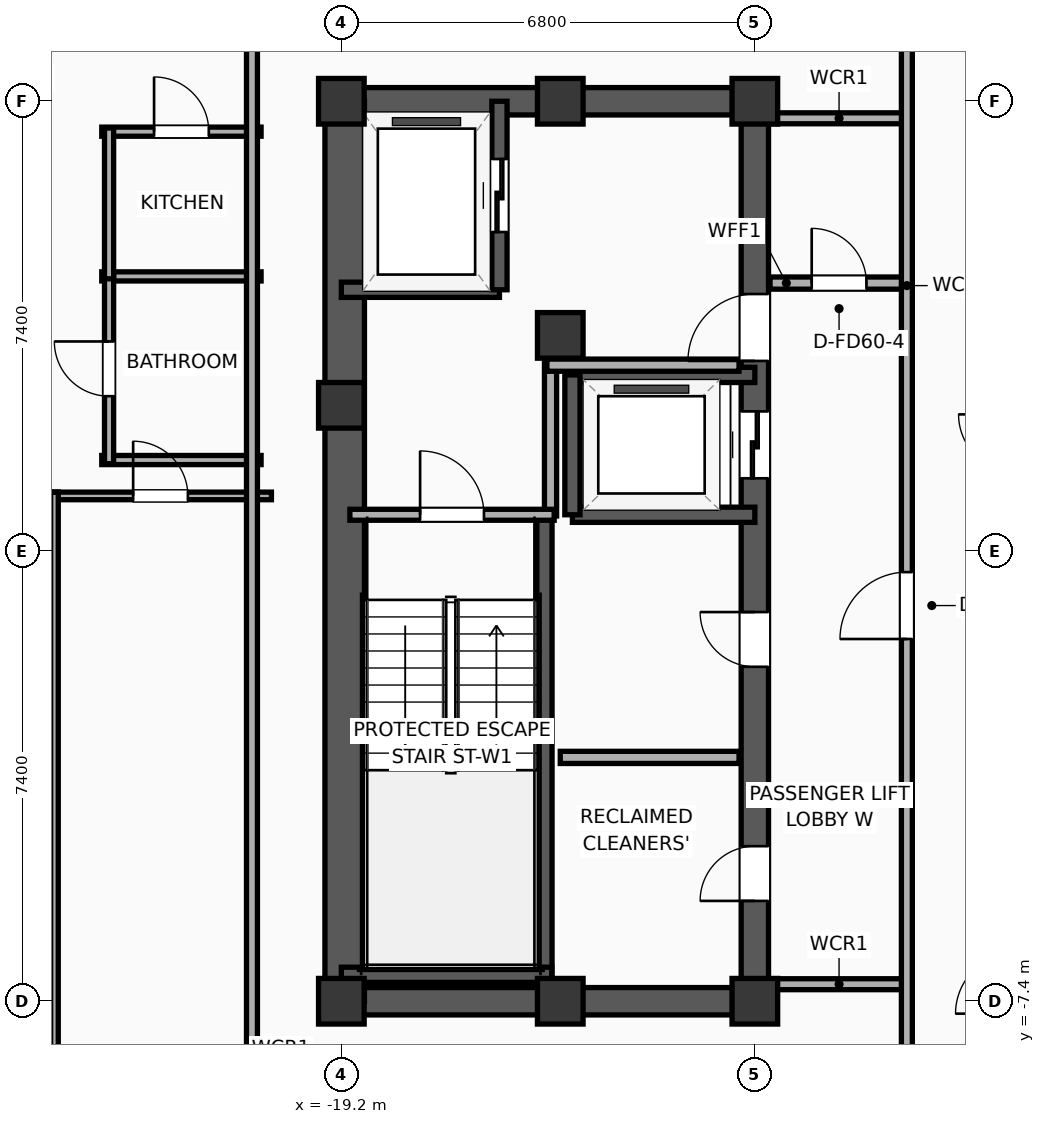
"""IFC4 building model, lengths in metres.
Left out: names, types, materials, properties, quantities, classifications, styles, units other than length and angle.
Written with IfcOpenShell. Run it as: python <this file> out.ifc"""

import sys

from ifc_helpers import new_model, si_unit, direction, frame, frame_2d, origin, origin_2d, place, context, subcontext, project, spatial, rectangle, extrude, element, fill, save


model = new_model("IFC4")
c1 = context("Model", 3, precision=1e-05, world=origin(), true_north=direction((0.0, 1.0)))
c2 = subcontext(c1, "Body", "Model", "MODEL_VIEW")
j1 = project(units=[si_unit("LENGTHUNIT", "METRE"), si_unit("PLANEANGLEUNIT", "RADIAN")], contexts=[c1])
p1 = place(None, origin())
s1 = spatial("IfcSite", under=j1, at=p1, CompositionType="ELEMENT")
p2 = place(p1, origin())
s2 = spatial("IfcBuilding", under=s1, at=p2, CompositionType="ELEMENT")
p3 = place(p2, frame((0.0, 0.0, 306.8)))
s3 = spatial("IfcBuildingStorey", under=s2, at=p3, CompositionType="ELEMENT", Elevation=306.8)
for number, where, z_axis, x_axis in (
    (1, (-19.2, -7.4, 0.0), (0.0, 0.0, 1.0), (1.0, 0.0, 0.0)),
    (2, (-19.2, 2.4, 0.0), (0.0, 0.0, 1.0), (1.0, 0.0, 0.0)),
    (3, (-19.2, 7.4, 0.0), (0.0, 0.0, 1.0), (1.0, 0.0, 0.0)),
    (4, (-15.6, -7.4, 0.0), (0.0, 0.0, 1.0), (1.0, 0.0, 0.0)),
    (5, (-15.6, 7.4, 0.0), (0.0, 0.0, 1.0), (1.0, 0.0, 0.0)),
    (6, (-12.4, -7.4, 0.0), (0.0, 0.0, 1.0), (1.0, 0.0, 0.0)),
    (7, (-15.6, 3.55, 0.0), (0.0, 0.0, 1.0), (1.0, 0.0, 0.0)),
    (8, (-12.4, 7.4, 0.0), (0.0, 0.0, 1.0), (1.0, 0.0, 0.0)),
):
    element("IfcColumn", number, at=place(p3, frame(where, z_axis=z_axis, x_axis=x_axis)), inside=s3, PredefinedType="COLUMN", context=c2, shape_type="SweptSolid", body=[
        extrude(rectangle(XDim=0.75, YDim=0.75, at=origin_2d()), origin(), (0.0, 0.0, 1.0), 3.9),
    ])
for number, where, z_axis, x_axis in (
    (9, (-19.425, -7.4, 0.0), (0.0, 0.0, 1.0), (1.0, 0.0, 0.0)),
    (10, (-19.425, 7.4, 0.0), (0.0, 0.0, 1.0), (1.0, 0.0, 0.0)),
):
    element("IfcWall", number, at=place(p3, frame(where, z_axis=z_axis, x_axis=x_axis)), inside=s3, PredefinedType="SHEAR", context=c2, shape_type="SweptSolid", body=[
        extrude(rectangle(XDim=7.25, YDim=0.45, at=frame_2d((3.625, 0.0))), origin(), (0.0, 0.0, 1.0), 3.5),
    ])
p4 = place(p3, frame((-19.145, -7.4, 0.0), z_axis=(0.0, 0.0, 1.0), x_axis=(0.0, 1.0, 0.0)))
e11 = element("IfcWall", 11, at=p4, inside=s3, PredefinedType="SHEAR", context=c2, shape_type="SweptSolid", body=[
    extrude(rectangle(XDim=14.8, YDim=0.65, at=frame_2d((7.4, 0.0))), origin(), (0.0, 0.0, 1.0), 3.5),
])
p5 = place(p3, frame((-12.4, -7.4, 0.0), z_axis=(0.0, 0.0, 1.0), x_axis=(0.0, 1.0, 0.0)))
e12 = element("IfcWall", 12, at=p5, inside=s3, PredefinedType="SHEAR", context=c2, shape_type="SweptSolid", body=[
    extrude(rectangle(XDim=14.8, YDim=0.45, at=frame_2d((7.4, 0.0))), origin(), (0.0, 0.0, 1.0), 3.5),
])
p6 = place(p5, frame((8.6, 0.0, 0.0)))
e13 = element("IfcOpeningElement", 13, at=p6, cuts=e12, PredefinedType="OPENING", context=c2, shape_type="SweptSolid", body=[
    extrude(rectangle(XDim=1.1, YDim=2.05, at=frame_2d((0.55, 1.025))), frame((0.0, 0.235, 0.0), z_axis=(0.0, -1.0, 0.0), x_axis=(1.0, 0.0, 0.0)), (0.0, 0.0, 1.0), 0.47),
])
p7 = place(p5, frame((10.53, 0.0, 0.0)))
e14 = element("IfcOpeningElement", 14, at=p7, cuts=e12, PredefinedType="OPENING", context=c2, shape_type="SweptSolid", body=[
    extrude(rectangle(XDim=1.1, YDim=2.05, at=frame_2d((0.55, 1.025))), frame((0.0, 0.235, 0.0), z_axis=(0.0, -1.0, 0.0), x_axis=(1.0, 0.0, 0.0)), (0.0, 0.0, 1.0), 0.47),
])
p8 = place(p5, frame((1.65, 0.0, 0.0)))
e15 = element("IfcOpeningElement", 15, at=p8, cuts=e12, PredefinedType="OPENING", context=c2, shape_type="SweptSolid", body=[
    extrude(rectangle(XDim=0.9, YDim=2.05, at=frame_2d((0.45, 1.025))), frame((0.0, 0.235, 0.0), z_axis=(0.0, -1.0, 0.0), x_axis=(1.0, 0.0, 0.0)), (0.0, 0.0, 1.0), 0.47),
])
p9 = place(p5, frame((5.5, 0.0, 0.0)))
e16 = element("IfcOpeningElement", 16, at=p9, cuts=e12, PredefinedType="OPENING", context=c2, shape_type="SweptSolid", body=[
    extrude(rectangle(XDim=0.9, YDim=2.05, at=frame_2d((0.45, 1.025))), frame((0.0, 0.235, 0.0), z_axis=(0.0, -1.0, 0.0), x_axis=(1.0, 0.0, 0.0)), (0.0, 0.0, 1.0), 0.47),
])
p10 = place(p3, frame((-15.86, -7.085, 0.0), z_axis=(0.0, 0.0, 1.0), x_axis=(0.0, 1.0, 0.0)))
e17 = element("IfcWall", 17, at=p10, inside=s3, PredefinedType="SOLIDWALL", context=c2, shape_type="SweptSolid", body=[
    extrude(rectangle(XDim=7.685, YDim=0.25, at=frame_2d((3.843, 0.0))), origin(), (0.0, 0.0, 1.0), 3.5),
])
p11 = place(p3, frame((-19.2, -6.965, 0.0), z_axis=(0.0, 0.0, 1.0), x_axis=(1.0, 0.0, 0.0)))
e18 = element("IfcWall", 18, at=p11, inside=s3, PredefinedType="SOLIDWALL", context=c2, shape_type="SweptSolid", body=[
    extrude(rectangle(XDim=3.46, YDim=0.25, at=frame_2d((1.73, 0.0))), origin(), (0.0, 0.0, 1.0), 3.5),
])
p12 = place(p3, frame((-19.2, 4.3, 0.0), z_axis=(0.0, 0.0, 1.0), x_axis=(1.0, 0.0, 0.0)))
e19 = element("IfcWall", 19, at=p12, inside=s3, PredefinedType="SOLIDWALL", context=c2, shape_type="SweptSolid", body=[
    extrude(rectangle(XDim=2.6, YDim=0.25, at=frame_2d((1.3, 0.0))), origin(), (0.0, 0.0, 1.0), 3.5),
])
p13 = place(p3, frame((-16.6, 4.3, 0.0), z_axis=(0.0, 0.0, 1.0), x_axis=(0.0, 1.0, 0.0)))
e20 = element("IfcWall", 20, at=p13, inside=s3, PredefinedType="SOLIDWALL", context=c2, shape_type="SweptSolid", body=[
    extrude(rectangle(XDim=3.1, YDim=0.25, at=frame_2d((1.55, 0.0))), origin(), (0.0, 0.0, 1.0), 3.5),
])
p14 = place(p13, frame((0.95, 0.0, 0.0)))
e21 = element("IfcOpeningElement", 21, at=p14, cuts=e20, PredefinedType="OPENING", context=c2, shape_type="SweptSolid", body=[
    extrude(rectangle(XDim=1.2, YDim=2.05, at=frame_2d((0.6, 1.025))), frame((0.0, 0.135, 0.0), z_axis=(0.0, -1.0, 0.0), x_axis=(1.0, 0.0, 0.0)), (0.0, 0.0, 1.0), 0.27),
])
for number, where, z_axis, x_axis in (
    (22, (-15.4, 0.6, 0.0), (0.0, 0.0, 1.0), (1.0, 0.0, 0.0)),
    (23, (-12.4, 2.9, 0.0), (0.0, 0.0, 1.0), (-1.0, 0.0, 0.0)),
):
    element("IfcWall", number, at=place(p3, frame(where, z_axis=z_axis, x_axis=x_axis)), inside=s3, PredefinedType="SOLIDWALL", context=c2, shape_type="SweptSolid", body=[
        extrude(rectangle(XDim=3.0, YDim=0.25, at=frame_2d((1.5, 0.0))), origin(), (0.0, 0.0, 1.0), 3.5),
    ])
p15 = place(p3, frame((-15.4, 2.9, 0.0), z_axis=(0.0, 0.0, 1.0), x_axis=(0.0, -1.0, 0.0)))
e24 = element("IfcWall", 24, at=p15, inside=s3, PredefinedType="SOLIDWALL", context=c2, shape_type="SweptSolid", body=[
    extrude(rectangle(XDim=2.3, YDim=0.25, at=frame_2d((1.15, 0.0))), origin(), (0.0, 0.0, 1.0), 3.5),
])
p16 = place(p3, frame((-15.76, 0.58, 0.0), z_axis=(0.0, 0.0, 1.0), x_axis=(0.0, 1.0, 0.0)))
e25 = element("IfcWall", 25, at=p16, inside=s3, PredefinedType="PARTITIONING", context=c2, shape_type="SweptSolid", body=[
    extrude(rectangle(XDim=2.52, YDim=0.2, at=frame_2d((1.26, 0.0))), origin(), (0.0, 0.0, 1.0), 3.5),
])
p17 = place(p3, frame((-15.82, 3.06, 0.0), z_axis=(0.0, 0.0, 1.0), x_axis=(1.0, 0.0, 0.0)))
e26 = element("IfcWall", 26, at=p17, inside=s3, PredefinedType="PARTITIONING", context=c2, shape_type="SweptSolid", body=[
    extrude(rectangle(XDim=3.16, YDim=0.2, at=frame_2d((1.58, 0.0))), origin(), (0.0, 0.0, 1.0), 3.5),
])
p18 = place(p3, frame((-19.06, 0.6, 0.0), z_axis=(0.0, 0.0, 1.0), x_axis=(1.0, 0.0, 0.0)))
e27 = element("IfcWall", 27, at=p18, inside=s3, PredefinedType="PARTITIONING", context=c2, shape_type="SweptSolid", body=[
    extrude(rectangle(XDim=3.36, YDim=0.18, at=frame_2d((1.68, 0.0))), origin(), (0.0, 0.0, 1.0), 3.5),
])
p19 = place(p18, frame((1.155, 0.0, 0.0)))
e28 = element("IfcOpeningElement", 28, at=p19, cuts=e27, PredefinedType="OPENING", context=c2, shape_type="SweptSolid", body=[
    extrude(rectangle(XDim=1.05, YDim=2.05, at=frame_2d((0.525, 1.025))), frame((0.0, 0.1, 0.0), z_axis=(0.0, -1.0, 0.0), x_axis=(1.0, 0.0, 0.0)), (0.0, 0.0, 1.0), 0.2),
])
p20 = place(p3, frame((-15.6, -3.39, 0.0), z_axis=(0.0, 0.0, 1.0), x_axis=(1.0, 0.0, 0.0)))
e29 = element("IfcWall", 29, at=p20, inside=s3, PredefinedType="PARTITIONING", context=c2, shape_type="SweptSolid", body=[
    extrude(rectangle(XDim=2.94, YDim=0.2, at=frame_2d((1.47, 0.0))), origin(), (0.0, 0.0, 1.0), 3.5),
])
p21 = place(p3, frame((-12.15, 4.41, 0.0), z_axis=(0.0, 0.0, 1.0), x_axis=(1.0, 0.0, 0.0)))
e30 = element("IfcWall", 30, at=p21, inside=s3, PredefinedType="PARTITIONING", context=c2, shape_type="SweptSolid", body=[
    extrude(rectangle(XDim=2.27, YDim=0.2, at=frame_2d((1.135, 0.0))), origin(), (0.0, 0.0, 1.0), 3.5),
])
p22 = place(p21, frame((0.685, 0.0, 0.0)))
e31 = element("IfcOpeningElement", 31, at=p22, cuts=e30, PredefinedType="OPENING", context=c2, shape_type="SweptSolid", body=[
    extrude(rectangle(XDim=0.9, YDim=2.05, at=frame_2d((0.45, 1.025))), frame((0.0, 0.11, 0.0), z_axis=(0.0, -1.0, 0.0), x_axis=(1.0, 0.0, 0.0)), (0.0, 0.0, 1.0), 0.22),
])
for number, where, z_axis, x_axis in (
    (32, (-12.15, 7.12, 0.0), (0.0, 0.0, 1.0), (1.0, 0.0, 0.0)),
    (33, (-12.15, -7.12, 0.0), (0.0, 0.0, 1.0), (1.0, 0.0, 0.0)),
):
    element("IfcWall", number, at=place(p3, frame(where, z_axis=z_axis, x_axis=x_axis)), inside=s3, PredefinedType="PARTITIONING", context=c2, shape_type="SweptSolid", body=[
        extrude(rectangle(XDim=2.27, YDim=0.18, at=frame_2d((1.135, 0.0))), origin(), (0.0, 0.0, 1.0), 2.54),
    ])
p23 = place(p3, frame((-9.9, -8.93, 0.0), z_axis=(0.0, 0.0, 1.0), x_axis=(0.0, 1.0, 0.0)))
e34 = element("IfcWall", 34, at=p23, inside=s3, PredefinedType="PARTITIONING", context=c2, shape_type="SweptSolid", body=[
    extrude(rectangle(XDim=17.86, YDim=0.18, at=frame_2d((8.93, 0.0))), origin(), (0.0, 0.0, 1.0), 3.5),
])
p24 = place(p23, frame((7.487, 0.0, 0.0)))
e35 = element("IfcOpeningElement", 35, at=p24, cuts=e34, PredefinedType="OPENING", context=c2, shape_type="SweptSolid", body=[
    extrude(rectangle(XDim=1.1, YDim=2.05, at=frame_2d((0.55, 1.025))), frame((0.0, 0.1, 0.0), z_axis=(0.0, -1.0, 0.0), x_axis=(1.0, 0.0, 0.0)), (0.0, 0.0, 1.0), 0.2),
])
p25 = place(p3, frame((-23.14, 6.9, 0.0), z_axis=(0.0, 0.0, 1.0), x_axis=(1.0, 0.0, 0.0)))
e36 = element("IfcWall", 36, at=p25, inside=s3, PredefinedType="PLUMBINGWALL", context=c2, shape_type="SweptSolid", body=[
    extrude(rectangle(XDim=2.62, YDim=0.15, at=frame_2d((1.31, 0.0))), origin(), (0.0, 0.0, 1.0), 3.5),
])
p26 = place(p25, frame((0.86, 0.0, 0.0)))
e37 = element("IfcOpeningElement", 37, at=p26, cuts=e36, PredefinedType="OPENING", context=c2, shape_type="SweptSolid", body=[
    extrude(rectangle(XDim=0.9, YDim=2.05, at=frame_2d((0.45, 1.025))), frame((0.0, 0.085, 0.0), z_axis=(0.0, -1.0, 0.0), x_axis=(1.0, 0.0, 0.0)), (0.0, 0.0, 1.0), 0.17),
])
for number, where, z_axis, x_axis in (
    (38, (-23.14, 4.52, 0.0), (0.0, 0.0, 1.0), (1.0, 0.0, 0.0)),
    (39, (-23.14, 1.5, 0.0), (0.0, 0.0, 1.0), (1.0, 0.0, 0.0)),
):
    element("IfcWall", number, at=place(p3, frame(where, z_axis=z_axis, x_axis=x_axis)), inside=s3, PredefinedType="PLUMBINGWALL", context=c2, shape_type="SweptSolid", body=[
        extrude(rectangle(XDim=2.62, YDim=0.15, at=frame_2d((1.31, 0.0))), origin(), (0.0, 0.0, 1.0), 3.5),
    ])
p27 = place(p3, frame((-23.02, 1.44, 0.0), z_axis=(0.0, 0.0, 1.0), x_axis=(0.0, 1.0, 0.0)))
e40 = element("IfcWall", 40, at=p27, inside=s3, PredefinedType="PLUMBINGWALL", context=c2, shape_type="SweptSolid", body=[
    extrude(rectangle(XDim=3.12, YDim=0.15, at=frame_2d((1.56, 0.0))), origin(), (0.0, 0.0, 1.0), 3.5),
])
p28 = place(p27, frame((1.11, 0.0, 0.0)))
e41 = element("IfcOpeningElement", 41, at=p28, cuts=e40, PredefinedType="OPENING", context=c2, shape_type="SweptSolid", body=[
    extrude(rectangle(XDim=0.9, YDim=2.05, at=frame_2d((0.45, 1.025))), frame((0.0, 0.085, 0.0), z_axis=(0.0, -1.0, 0.0), x_axis=(1.0, 0.0, 0.0)), (0.0, 0.0, 1.0), 0.17),
])
p29 = place(p3, frame((-23.02, 4.48, 0.0), z_axis=(0.0, 0.0, 1.0), x_axis=(0.0, 1.0, 0.0)))
e42 = element("IfcWall", 42, at=p29, inside=s3, PredefinedType="PLUMBINGWALL", context=c2, shape_type="SweptSolid", body=[
    extrude(rectangle(XDim=2.48, YDim=0.15, at=frame_2d((1.24, 0.0))), origin(), (0.0, 0.0, 1.0), 3.5),
])
p30 = place(p3, frame((-27.229, 0.91, 0.0), z_axis=(0.0, 0.0, 1.0), x_axis=(1.0, 0.0, 0.0)))
e43 = element("IfcWall", 43, at=p30, inside=s3, PredefinedType="PARTITIONING", context=c2, shape_type="SweptSolid", body=[
    extrude(rectangle(XDim=3.374, YDim=0.125, at=frame_2d((1.687, 0.0))), origin(), (0.0, 0.0, 1.0), 3.5),
])
p31 = place(p30, frame((1.237, 0.0, 0.0)))
e44 = element("IfcOpeningElement", 44, at=p31, cuts=e43, PredefinedType="OPENING", context=c2, shape_type="SweptSolid", body=[
    extrude(rectangle(XDim=0.9, YDim=2.05, at=frame_2d((0.45, 1.025))), frame((0.0, 0.073, 0.0), z_axis=(0.0, -1.0, 0.0), x_axis=(1.0, 0.0, 0.0)), (0.0, 0.0, 1.0), 0.145),
])
p32 = place(p3, frame((-23.98, 0.91, 0.0), z_axis=(0.0, 0.0, 1.0), x_axis=(1.0, 0.0, 0.0)))
e45 = element("IfcWall", 45, at=p32, inside=s3, PredefinedType="PARTITIONING", context=c2, shape_type="SweptSolid", body=[
    extrude(rectangle(XDim=3.63, YDim=0.125, at=frame_2d((1.815, 0.0))), origin(), (0.0, 0.0, 1.0), 3.5),
])
p33 = place(p32, frame((1.356, 0.0, 0.0)))
e46 = element("IfcOpeningElement", 46, at=p33, cuts=e45, PredefinedType="OPENING", context=c2, shape_type="SweptSolid", body=[
    extrude(rectangle(XDim=0.9, YDim=2.05, at=frame_2d((0.45, 1.025))), frame((0.0, 0.073, 0.0), z_axis=(0.0, -1.0, 0.0), x_axis=(1.0, 0.0, 0.0)), (0.0, 0.0, 1.0), 0.145),
])
p34 = place(p3, frame((-23.918, -9.16, 0.0), z_axis=(0.0, 0.0, 1.0), x_axis=(0.0, 1.0, 0.0)))
e47 = element("IfcWall", 47, at=p34, inside=s3, PredefinedType="PARTITIONING", context=c2, shape_type="SweptSolid", body=[
    extrude(rectangle(XDim=10.13, YDim=0.125, at=frame_2d((5.065, 0.0))), origin(), (0.0, 0.0, 1.0), 3.5),
])
p35 = place(p3, frame((-20.67, -8.96, 0.0), z_axis=(0.0, 0.0, 1.0), x_axis=(0.0, 1.0, 0.0)))
e48 = element("IfcWall", 48, at=p35, inside=s3, PredefinedType="PARTITIONING", context=c2, shape_type="SweptSolid", body=[
    extrude(rectangle(XDim=17.92, YDim=0.18, at=frame_2d((8.96, 0.0))), origin(), (0.0, 0.0, 1.0), 3.5),
])
p36 = place(p14, origin())
e49 = element("IfcDoor", 49, at=p36, inside=s3, OperationType="SLIDING_TO_LEFT", PredefinedType="DOOR", context=c2, shape_type="SweptSolid", body=[
    extrude(rectangle(XDim=1.2, YDim=2.05, at=frame_2d((0.6, 1.025))), frame((0.0, 0.025, 0.0), z_axis=(0.0, -1.0, 0.0), x_axis=(1.0, 0.0, 0.0)), (0.0, 0.0, 1.0), 0.05),
])
fill(e21, e49)
p37 = place(p6, origin())
e50 = element("IfcDoor", 50, at=p37, inside=s3, OperationType="SLIDING_TO_LEFT", PredefinedType="DOOR", context=c2, shape_type="SweptSolid", body=[
    extrude(rectangle(XDim=1.1, YDim=2.05, at=frame_2d((0.55, 1.025))), frame((0.0, 0.025, 0.0), z_axis=(0.0, -1.0, 0.0), x_axis=(1.0, 0.0, 0.0)), (0.0, 0.0, 1.0), 0.05),
])
fill(e13, e50)
p38 = place(p19, origin())
e51 = element("IfcDoor", 51, at=p38, inside=s3, OperationType="SINGLE_SWING_LEFT", PredefinedType="DOOR", context=c2, shape_type="SweptSolid", body=[
    extrude(rectangle(XDim=1.05, YDim=2.05, at=frame_2d((0.525, 1.025))), frame((0.0, 0.025, 0.0), z_axis=(0.0, -1.0, 0.0), x_axis=(1.0, 0.0, 0.0)), (0.0, 0.0, 1.0), 0.05),
])
fill(e28, e51)
p39 = place(p22, origin())
e52 = element("IfcDoor", 52, at=p39, inside=s3, OperationType="SINGLE_SWING_LEFT", PredefinedType="DOOR", context=c2, shape_type="SweptSolid", body=[
    extrude(rectangle(XDim=0.9, YDim=2.05, at=frame_2d((0.45, 1.025))), frame((0.0, 0.025, 0.0), z_axis=(0.0, -1.0, 0.0), x_axis=(1.0, 0.0, 0.0)), (0.0, 0.0, 1.0), 0.05),
])
fill(e31, e52)
p40 = place(p24, origin())
e53 = element("IfcDoor", 53, at=p40, inside=s3, OperationType="SINGLE_SWING_LEFT", PredefinedType="DOOR", context=c2, shape_type="SweptSolid", body=[
    extrude(rectangle(XDim=1.1, YDim=2.05, at=frame_2d((0.55, 1.025))), frame((0.0, 0.025, 0.0), z_axis=(0.0, -1.0, 0.0), x_axis=(1.0, 0.0, 0.0)), (0.0, 0.0, 1.0), 0.05),
])
fill(e35, e53)
p41 = place(p26, origin())
e54 = element("IfcDoor", 54, at=p41, inside=s3, OperationType="SINGLE_SWING_LEFT", PredefinedType="DOOR", context=c2, shape_type="SweptSolid", body=[
    extrude(rectangle(XDim=0.9, YDim=2.05, at=frame_2d((0.45, 1.025))), frame((0.0, 0.025, 0.0), z_axis=(0.0, -1.0, 0.0), x_axis=(1.0, 0.0, 0.0)), (0.0, 0.0, 1.0), 0.05),
])
fill(e37, e54)
p42 = place(p28, origin())
e55 = element("IfcDoor", 55, at=p42, inside=s3, OperationType="SINGLE_SWING_RIGHT", PredefinedType="DOOR", context=c2, shape_type="SweptSolid", body=[
    extrude(rectangle(XDim=0.9, YDim=2.05, at=frame_2d((0.45, 1.025))), frame((0.0, 0.025, 0.0), z_axis=(0.0, -1.0, 0.0), x_axis=(1.0, 0.0, 0.0)), (0.0, 0.0, 1.0), 0.05),
])
fill(e41, e55)
p43 = place(p33, origin())
e56 = element("IfcDoor", 56, at=p43, inside=s3, OperationType="SINGLE_SWING_LEFT", PredefinedType="DOOR", context=c2, shape_type="SweptSolid", body=[
    extrude(rectangle(XDim=0.9, YDim=2.05, at=frame_2d((0.45, 1.025))), frame((0.0, 0.025, 0.0), z_axis=(0.0, -1.0, 0.0), x_axis=(1.0, 0.0, 0.0)), (0.0, 0.0, 1.0), 0.05),
])
fill(e46, e56)
p44 = place(p7, origin())
e57 = element("IfcDoor", 57, at=p44, inside=s3, OperationType="SINGLE_SWING_LEFT", PredefinedType="DOOR", context=c2, shape_type="SweptSolid", body=[
    extrude(rectangle(XDim=1.1, YDim=2.05, at=frame_2d((0.55, 1.025))), frame((0.0, 0.025, 0.0), z_axis=(0.0, -1.0, 0.0), x_axis=(1.0, 0.0, 0.0)), (0.0, 0.0, 1.0), 0.05),
])
fill(e14, e57)
p45 = place(p8, origin())
e58 = element("IfcDoor", 58, at=p45, inside=s3, OperationType="SINGLE_SWING_LEFT", PredefinedType="DOOR", context=c2, shape_type="SweptSolid", body=[
    extrude(rectangle(XDim=0.9, YDim=2.05, at=frame_2d((0.45, 1.025))), frame((0.0, 0.025, 0.0), z_axis=(0.0, -1.0, 0.0), x_axis=(1.0, 0.0, 0.0)), (0.0, 0.0, 1.0), 0.05),
])
fill(e15, e58)
p46 = place(p9, origin())
e59 = element("IfcDoor", 59, at=p46, inside=s3, OperationType="SINGLE_SWING_RIGHT", PredefinedType="DOOR", context=c2, shape_type="SweptSolid", body=[
    extrude(rectangle(XDim=0.9, YDim=2.05, at=frame_2d((0.45, 1.025))), frame((0.0, 0.025, 0.0), z_axis=(0.0, -1.0, 0.0), x_axis=(1.0, 0.0, 0.0)), (0.0, 0.0, 1.0), 0.05),
])
fill(e16, e59)
save(model, sys.argv[1])
